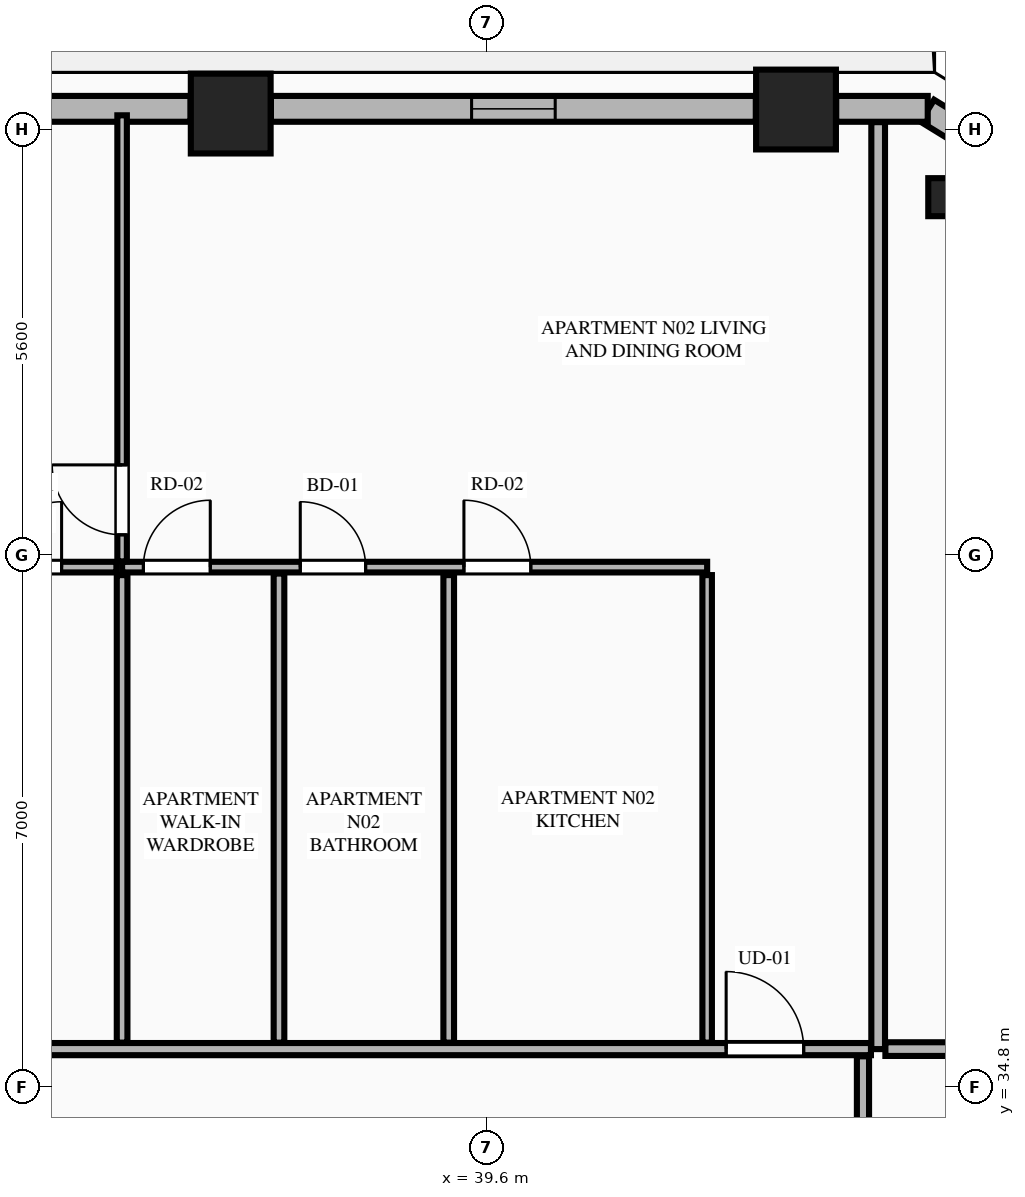
"""IFC4 building model, lengths in metres.
Left out: names, types, materials, properties, quantities, classifications, styles, units other than length and angle.
Written with IfcOpenShell. Run it as: python <this file> out.ifc"""

import sys

from ifc_helpers import new_model, si_unit, direction, frame, frame_2d, origin, origin_2d, place, context, subcontext, project, spatial, rectangle, extrude, element, fill, save


model = new_model("IFC4")
c1 = context("Model", 3, precision=1e-05, world=origin(), true_north=direction((0.0, 1.0)))
c2 = subcontext(c1, "Body", "Model", "MODEL_VIEW")
j1 = project(units=[si_unit("LENGTHUNIT", "METRE"), si_unit("PLANEANGLEUNIT", "RADIAN")], contexts=[c1])
p1 = place(None, origin())
s1 = spatial("IfcSite", under=j1, at=p1, CompositionType="ELEMENT")
p2 = place(p1, origin())
s2 = spatial("IfcBuilding", under=s1, at=p2, CompositionType="ELEMENT")
p3 = place(p2, frame((0.0, 0.0, 133.9)))
s3 = spatial("IfcBuildingStorey", under=s2, at=p3, CompositionType="ELEMENT", Elevation=133.9)
for number, where, z_axis, x_axis in (
    (1, (43.669, 47.661, 0.0), (0.0, 0.0, 1.0), (1.0, 0.0, 0.0)),
    (2, (36.232, 47.608, 0.0), (0.0, 0.0, 1.0), (1.0, 0.0, 0.0)),
):
    element("IfcColumn", number, at=place(p3, frame(where, z_axis=z_axis, x_axis=x_axis)), inside=s3, PredefinedType="COLUMN", context=c2, shape_type="SweptSolid", body=[
        extrude(rectangle(XDim=1.05, YDim=1.05, at=origin_2d()), origin(), (0.0, 0.0, 1.0), 3.55),
    ])
p4 = place(p3, frame((45.659, 46.508, 0.0), z_axis=(0.0, 0.0, 1.0), x_axis=(-0.865160173452, 0.501495637342, 0.0)))
e3 = element("IfcColumn", 3, at=p4, inside=s3, PredefinedType="PILASTER", context=c2, shape_type="SweptSolid", body=[
    extrude(rectangle(XDim=0.5, YDim=0.35, at=origin_2d()), origin(), (0.0, 0.0, 1.0), 3.55),
])
p5 = place(p3, frame((46.971, 46.677, 0.0), z_axis=(0.0, 0.0, 1.0), x_axis=(-0.851798915137, 0.523868884523, 0.0)))
e4 = element("IfcWall", 4, at=p5, inside=s3, PredefinedType="STANDARD", context=c2, shape_type="SweptSolid", body=[
    extrude(rectangle(XDim=1.848, YDim=0.34, at=frame_2d((0.924, 0.0))), origin(), (0.0, 0.0, 1.0), 3.34),
])
p6 = place(p3, frame((45.402, 47.67, 0.0), z_axis=(0.0, 0.0, 1.0), x_axis=(-1.0, 0.0, 0.0)))
e5 = element("IfcWall", 5, at=p6, inside=s3, PredefinedType="STANDARD", context=c2, shape_type="SweptSolid", body=[
    extrude(rectangle(XDim=1.204, YDim=0.34, at=frame_2d((0.602, 0.0))), origin(), (0.0, 0.0, 1.0), 3.34),
])
p7 = place(p3, frame((43.14, 47.67, 0.0), z_axis=(0.0, 0.0, 1.0), x_axis=(-1.0, 0.0, 0.0)))
e6 = element("IfcWall", 6, at=p7, inside=s3, PredefinedType="STANDARD", context=c2, shape_type="SweptSolid", body=[
    extrude(rectangle(XDim=6.379, YDim=0.34, at=frame_2d((3.189, 0.0))), origin(), (0.0, 0.0, 1.0), 2.797),
])
p8 = place(p7, frame((2.639, 0.0, 0.75)))
e7 = element("IfcOpeningElement", 7, at=p8, cuts=e6, PredefinedType="OPENING", context=c2, shape_type="SweptSolid", body=[
    extrude(rectangle(XDim=1.1, YDim=1.897, at=frame_2d((0.55, 0.948))), frame((0.0, 0.18, 0.0), z_axis=(0.0, -1.0, 0.0), x_axis=(1.0, 0.0, 0.0)), (0.0, 0.0, 1.0), 0.36),
])
p9 = place(p3, frame((35.703, 47.67, 0.0), z_axis=(0.0, 0.0, 1.0), x_axis=(-1.0, 0.0, 0.0)))
e8 = element("IfcWall", 8, at=p9, inside=s3, PredefinedType="STANDARD", context=c2, shape_type="SweptSolid", body=[
    extrude(rectangle(XDim=6.606, YDim=0.34, at=frame_2d((3.303, 0.0))), origin(), (0.0, 0.0, 1.0), 2.797),
])
p10 = place(p9, frame((3.254, 0.0, 0.0)))
e9 = element("IfcOpeningElement", 9, at=p10, cuts=e8, PredefinedType="OPENING", context=c2, shape_type="SweptSolid", body=[
    extrude(rectangle(XDim=1.1, YDim=2.25, at=frame_2d((0.55, 1.125))), frame((0.0, 0.18, 0.0), z_axis=(0.0, -1.0, 0.0), x_axis=(1.0, 0.0, 0.0)), (0.0, 0.0, 1.0), 0.36),
])
p11 = place(p3, frame((44.75, 35.3, 0.0), z_axis=(0.0, 0.0, 1.0), x_axis=(0.0, 1.0, 0.0)))
e10 = element("IfcWall", 10, at=p11, inside=s3, PredefinedType="PARTITIONING", context=c2, shape_type="SweptSolid", body=[
    extrude(rectangle(XDim=12.195, YDim=0.18, at=frame_2d((6.098, 0.0))), origin(), (0.0, 0.0, 1.0), 3.34),
])
p12 = place(p3, frame((28.663, 35.3, 0.0), z_axis=(0.0, 0.0, 1.0), x_axis=(1.0, 0.0, 0.0)))
e11 = element("IfcWall", 11, at=p12, inside=s3, PredefinedType="PARTITIONING", context=c2, shape_type="SweptSolid", body=[
    extrude(rectangle(XDim=15.992, YDim=0.16, at=frame_2d((7.996, 0.0))), origin(), (0.0, 0.0, 1.0), 3.34),
])
p13 = place(p12, frame((14.087, 0.0, 0.0)))
e12 = element("IfcOpeningElement", 12, at=p13, cuts=e11, PredefinedType="OPENING", context=c2, shape_type="SweptSolid", body=[
    extrude(rectangle(XDim=1.02, YDim=2.25, at=frame_2d((0.51, 1.125))), frame((0.0, 0.09, 0.0), z_axis=(0.0, -1.0, 0.0), x_axis=(1.0, 0.0, 0.0)), (0.0, 0.0, 1.0), 0.18),
])
p14 = place(p3, frame((42.5, 35.385, 0.0), z_axis=(0.0, 0.0, 1.0), x_axis=(0.0, 1.0, 0.0)))
e13 = element("IfcWall", 13, at=p14, inside=s3, PredefinedType="PARTITIONING", context=c2, shape_type="SweptSolid", body=[
    extrude(rectangle(XDim=6.151, YDim=0.125, at=frame_2d((3.075, 0.0))), origin(), (0.0, 0.0, 1.0), 2.722),
])
p15 = place(p3, frame((34.803, 41.641, 0.0), z_axis=(0.0, 0.0, 1.0), x_axis=(1.0, 0.0, 0.0)))
e14 = element("IfcWall", 14, at=p15, inside=s3, PredefinedType="PLUMBINGWALL", context=c2, shape_type="SweptSolid", body=[
    extrude(rectangle(XDim=7.697, YDim=0.14, at=frame_2d((3.849, 0.0))), origin(), (0.0, 0.0, 1.0), 3.34),
])
p16 = place(p15, frame((0.28, 0.0, 0.0)))
e15 = element("IfcOpeningElement", 15, at=p16, cuts=e14, PredefinedType="OPENING", context=c2, shape_type="SweptSolid", body=[
    extrude(rectangle(XDim=0.88, YDim=2.15, at=frame_2d((0.44, 1.075))), frame((0.0, 0.08, 0.0), z_axis=(0.0, -1.0, 0.0), x_axis=(1.0, 0.0, 0.0)), (0.0, 0.0, 1.0), 0.16),
])
p17 = place(p15, frame((2.344, 0.0, 0.0)))
e16 = element("IfcOpeningElement", 16, at=p17, cuts=e14, PredefinedType="OPENING", context=c2, shape_type="SweptSolid", body=[
    extrude(rectangle(XDim=0.86, YDim=2.1, at=frame_2d((0.43, 1.05))), frame((0.0, 0.08, 0.0), z_axis=(0.0, -1.0, 0.0), x_axis=(1.0, 0.0, 0.0)), (0.0, 0.0, 1.0), 0.16),
])
p18 = place(p15, frame((4.497, 0.0, 0.0)))
e17 = element("IfcOpeningElement", 17, at=p18, cuts=e14, PredefinedType="OPENING", context=c2, shape_type="SweptSolid", body=[
    extrude(rectangle(XDim=0.88, YDim=2.15, at=frame_2d((0.44, 1.075))), frame((0.0, 0.08, 0.0), z_axis=(0.0, -1.0, 0.0), x_axis=(1.0, 0.0, 0.0)), (0.0, 0.0, 1.0), 0.16),
])
p19 = place(p3, frame((28.663, 41.641, 0.0), z_axis=(0.0, 0.0, 1.0), x_axis=(1.0, 0.0, 0.0)))
e18 = element("IfcWall", 18, at=p19, inside=s3, PredefinedType="PLUMBINGWALL", context=c2, shape_type="SweptSolid", body=[
    extrude(rectangle(XDim=6.065, YDim=0.14, at=frame_2d((3.032, 0.0))), origin(), (0.0, 0.0, 1.0), 3.34),
])
p20 = place(p19, frame((0.28, 0.0, 0.0)))
e19 = element("IfcOpeningElement", 19, at=p20, cuts=e18, PredefinedType="OPENING", context=c2, shape_type="SweptSolid", body=[
    extrude(rectangle(XDim=0.88, YDim=2.15, at=frame_2d((0.44, 1.075))), frame((0.0, 0.08, 0.0), z_axis=(0.0, -1.0, 0.0), x_axis=(1.0, 0.0, 0.0)), (0.0, 0.0, 1.0), 0.16),
])
p21 = place(p19, frame((4.484, 0.0, 0.0)))
e20 = element("IfcOpeningElement", 20, at=p21, cuts=e18, PredefinedType="OPENING", context=c2, shape_type="SweptSolid", body=[
    extrude(rectangle(XDim=0.86, YDim=2.1, at=frame_2d((0.43, 1.05))), frame((0.0, 0.08, 0.0), z_axis=(0.0, -1.0, 0.0), x_axis=(1.0, 0.0, 0.0)), (0.0, 0.0, 1.0), 0.16),
])
for number, where, z_axis, x_axis in (
    (21, (39.1, 35.385, 0.0), (0.0, 0.0, 1.0), (0.0, 1.0, 0.0)),
    (22, (34.803, 35.385, 0.0), (0.0, 0.0, 1.0), (0.0, 1.0, 0.0)),
):
    element("IfcWall", number, at=place(p3, frame(where, z_axis=z_axis, x_axis=x_axis)), inside=s3, PredefinedType="PLUMBINGWALL", context=c2, shape_type="SweptSolid", body=[
        extrude(rectangle(XDim=6.151, YDim=0.14, at=frame_2d((3.075, 0.0))), origin(), (0.0, 0.0, 1.0), 3.34),
    ])
p22 = place(p3, frame((34.803, 41.716, 0.0), z_axis=(0.0, 0.0, 1.0), x_axis=(0.0, 1.0, 0.0)))
e23 = element("IfcWall", 23, at=p22, inside=s3, PredefinedType="PARTITIONING", context=c2, shape_type="SweptSolid", body=[
    extrude(rectangle(XDim=5.869, YDim=0.125, at=frame_2d((2.935, 0.0))), origin(), (0.0, 0.0, 1.0), 3.34),
])
p23 = place(p22, frame((0.35, 0.0, 0.0)))
e24 = element("IfcOpeningElement", 24, at=p23, cuts=e23, PredefinedType="OPENING", context=c2, shape_type="SweptSolid", body=[
    extrude(rectangle(XDim=0.92, YDim=2.15, at=frame_2d((0.46, 1.075))), frame((0.0, 0.073, 0.0), z_axis=(0.0, -1.0, 0.0), x_axis=(1.0, 0.0, 0.0)), (0.0, 0.0, 1.0), 0.145),
])
p24 = place(p3, frame((36.867, 35.385, 0.0), z_axis=(0.0, 0.0, 1.0), x_axis=(0.0, 1.0, 0.0)))
e25 = element("IfcWall", 25, at=p24, inside=s3, PredefinedType="PLUMBINGWALL", context=c2, shape_type="SweptSolid", body=[
    extrude(rectangle(XDim=6.171, YDim=0.14, at=frame_2d((3.085, 0.0))), origin(), (0.0, 0.0, 1.0), 3.34),
])
p25 = place(p3, frame((44.845, 35.3, 0.0), z_axis=(0.0, 0.0, 1.0), x_axis=(1.0, 0.0, 0.0)))
e26 = element("IfcWall", 26, at=p25, inside=s3, PredefinedType="PARTITIONING", context=c2, shape_type="SweptSolid", body=[
    extrude(rectangle(XDim=7.669, YDim=0.18, at=frame_2d((3.834, 0.0))), origin(), (0.0, 0.0, 1.0), 3.34),
])
p26 = place(p3, frame((44.55, 25.995, 0.0), z_axis=(0.0, 0.0, 1.0), x_axis=(0.0, 1.0, 0.0)))
e27 = element("IfcWall", 27, at=p26, inside=s3, PredefinedType="PARTITIONING", context=c2, shape_type="SweptSolid", body=[
    extrude(rectangle(XDim=9.21, YDim=0.16, at=frame_2d((4.605, 0.0))), origin(), (0.0, 0.0, 1.0), 3.34),
])
p27 = place(p26, frame((0.45, 0.0, 0.0)))
e28 = element("IfcOpeningElement", 28, at=p27, cuts=e27, PredefinedType="OPENING", context=c2, shape_type="SweptSolid", body=[
    extrude(rectangle(XDim=1.02, YDim=2.25, at=frame_2d((0.51, 1.125))), frame((0.0, 0.09, 0.0), z_axis=(0.0, -1.0, 0.0), x_axis=(1.0, 0.0, 0.0)), (0.0, 0.0, 1.0), 0.18),
])
p28 = place(p8, origin())
e29 = element("IfcWindow", 29, at=p28, inside=s3, PartitioningType="SINGLE_PANEL", PredefinedType="WINDOW", context=c2, shape_type="SweptSolid", body=[
    extrude(rectangle(XDim=1.1, YDim=1.897, at=frame_2d((0.55, 0.948))), frame((0.0, 0.03, 0.0), z_axis=(0.0, -1.0, 0.0), x_axis=(1.0, 0.0, 0.0)), (0.0, 0.0, 1.0), 0.06),
])
fill(e7, e29)
p29 = place(p16, origin())
e30 = element("IfcDoor", 30, at=p29, inside=s3, OperationType="SINGLE_SWING_RIGHT", PredefinedType="DOOR", context=c2, shape_type="SweptSolid", body=[
    extrude(rectangle(XDim=0.88, YDim=2.15, at=frame_2d((0.44, 1.075))), frame((0.0, 0.025, 0.0), z_axis=(0.0, -1.0, 0.0), x_axis=(1.0, 0.0, 0.0)), (0.0, 0.0, 1.0), 0.05),
])
fill(e15, e30)
p30 = place(p17, origin())
e31 = element("IfcDoor", 31, at=p30, inside=s3, OperationType="SINGLE_SWING_LEFT", PredefinedType="DOOR", context=c2, shape_type="SweptSolid", body=[
    extrude(rectangle(XDim=0.86, YDim=2.1, at=frame_2d((0.43, 1.05))), frame((0.0, 0.025, 0.0), z_axis=(0.0, -1.0, 0.0), x_axis=(1.0, 0.0, 0.0)), (0.0, 0.0, 1.0), 0.05),
])
fill(e16, e31)
p31 = place(p21, origin())
e32 = element("IfcDoor", 32, at=p31, inside=s3, OperationType="SINGLE_SWING_RIGHT", PredefinedType="DOOR", context=c2, shape_type="SweptSolid", body=[
    extrude(rectangle(XDim=0.86, YDim=2.1, at=frame_2d((0.43, 1.05))), frame((0.0, 0.025, 0.0), z_axis=(0.0, -1.0, 0.0), x_axis=(1.0, 0.0, 0.0)), (0.0, 0.0, 1.0), 0.05),
])
fill(e20, e32)
p32 = place(p13, origin())
e33 = element("IfcDoor", 33, at=p32, inside=s3, OperationType="SINGLE_SWING_LEFT", PredefinedType="DOOR", context=c2, shape_type="SweptSolid", body=[
    extrude(rectangle(XDim=1.02, YDim=2.25, at=frame_2d((0.51, 1.125))), frame((0.0, 0.025, 0.0), z_axis=(0.0, -1.0, 0.0), x_axis=(1.0, 0.0, 0.0)), (0.0, 0.0, 1.0), 0.05),
])
fill(e12, e33)
p33 = place(p18, origin())
e34 = element("IfcDoor", 34, at=p33, inside=s3, OperationType="SINGLE_SWING_LEFT", PredefinedType="DOOR", context=c2, shape_type="SweptSolid", body=[
    extrude(rectangle(XDim=0.88, YDim=2.15, at=frame_2d((0.44, 1.075))), frame((0.0, 0.025, 0.0), z_axis=(0.0, -1.0, 0.0), x_axis=(1.0, 0.0, 0.0)), (0.0, 0.0, 1.0), 0.05),
])
fill(e17, e34)
p34 = place(p23, origin())
e35 = element("IfcDoor", 35, at=p34, inside=s3, OperationType="SINGLE_SWING_RIGHT", PredefinedType="DOOR", context=c2, shape_type="SweptSolid", body=[
    extrude(rectangle(XDim=0.92, YDim=2.15, at=frame_2d((0.46, 1.075))), frame((0.0, 0.025, 0.0), z_axis=(0.0, -1.0, 0.0), x_axis=(1.0, 0.0, 0.0)), (0.0, 0.0, 1.0), 0.05),
])
fill(e24, e35)
save(model, sys.argv[1])
